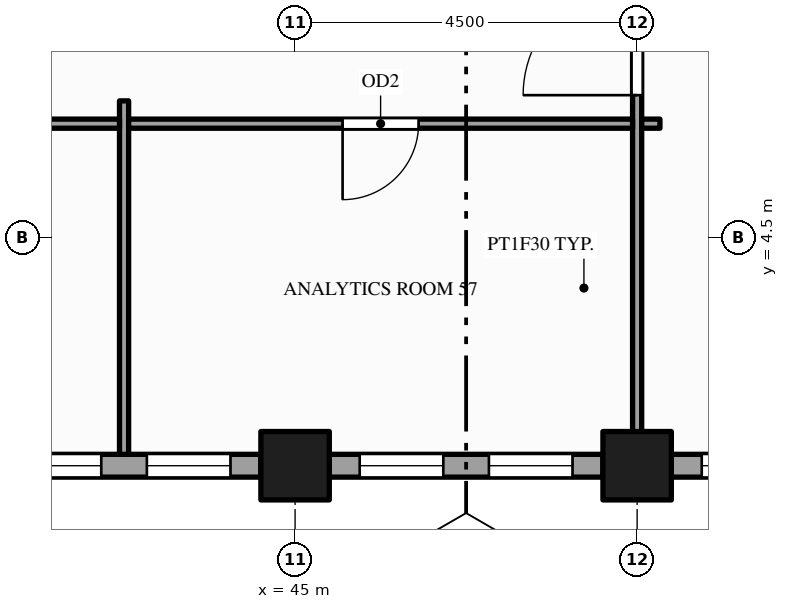
"""IFC4 building model, lengths in metres.
Left out: names, types, materials, properties, quantities, classifications, styles, units other than length and angle.
Written with IfcOpenShell. Run it as: python <this file> out.ifc"""

import sys

from ifc_helpers import new_model, si_unit, direction, frame, frame_2d, origin, origin_2d, place, context, subcontext, project, spatial, rectangle, hollow_rectangle, extrude, element, fill, save


model = new_model("IFC4")
c1 = context("Model", 3, precision=1e-05, world=origin(), true_north=direction((0.0, 1.0)))
c2 = subcontext(c1, "Body", "Model", "MODEL_VIEW")
j1 = project(units=[si_unit("LENGTHUNIT", "METRE"), si_unit("PLANEANGLEUNIT", "RADIAN")], contexts=[c1])
p1 = place(None, origin())
s1 = spatial("IfcSite", under=j1, at=p1, CompositionType="ELEMENT")
p2 = place(p1, origin())
s2 = spatial("IfcBuilding", under=s1, at=p2, CompositionType="ELEMENT")
p3 = place(p2, frame((0.0, 0.0, 183.0)))
s3 = spatial("IfcBuildingStorey", under=s2, at=p3, CompositionType="ELEMENT", Elevation=183.0)
for number, where, z_axis, x_axis in (
    (1, (45.0, 1.5, -0.15), (0.0, 0.0, 1.0), (1.0, 0.0, 0.0)),
    (2, (49.5, 1.5, -0.15), (0.0, 0.0, 1.0), (1.0, 0.0, 0.0)),
):
    element("IfcColumn", number, at=place(p3, frame(where, z_axis=z_axis, x_axis=x_axis)), inside=s3, PredefinedType="COLUMN", context=c2, shape_type="SweptSolid", body=[
        extrude(hollow_rectangle(XDim=0.9, YDim=0.9, WallThickness=0.045, at=origin_2d()), origin(), (0.0, 0.0, 1.0), 3.9),
    ])
p4 = place(p3, frame((40.95, 1.5, 0.0), z_axis=(0.0, 0.0, 1.0), x_axis=(1.0, 0.0, 0.0)))
e3 = element("IfcWall", 3, at=p4, inside=s3, PredefinedType="STANDARD", context=c2, shape_type="SweptSolid", body=[
    extrude(rectangle(XDim=3.6, YDim=0.3, at=frame_2d((1.8, 0.0))), origin(), (0.0, 0.0, 1.0), 2.77),
])
p5 = place(p4, frame((0.4, 0.0, 0.9)))
e4 = element("IfcOpeningElement", 4, at=p5, cuts=e3, PredefinedType="OPENING", context=c2, shape_type="SweptSolid", body=[
    extrude(rectangle(XDim=1.1, YDim=1.5, at=frame_2d((0.55, 0.75))), frame((0.0, 0.16, 0.0), z_axis=(0.0, -1.0, 0.0), x_axis=(1.0, 0.0, 0.0)), (0.0, 0.0, 1.0), 0.32),
])
p6 = place(p4, frame((2.1, 0.0, 0.9)))
e5 = element("IfcOpeningElement", 5, at=p6, cuts=e3, PredefinedType="OPENING", context=c2, shape_type="SweptSolid", body=[
    extrude(rectangle(XDim=1.1, YDim=1.5, at=frame_2d((0.55, 0.75))), frame((0.0, 0.16, 0.0), z_axis=(0.0, -1.0, 0.0), x_axis=(1.0, 0.0, 0.0)), (0.0, 0.0, 1.0), 0.32),
])
p7 = place(p3, frame((45.45, 1.5, 0.0), z_axis=(0.0, 0.0, 1.0), x_axis=(1.0, 0.0, 0.0)))
e6 = element("IfcWall", 6, at=p7, inside=s3, PredefinedType="STANDARD", context=c2, shape_type="SweptSolid", body=[
    extrude(rectangle(XDim=3.6, YDim=0.3, at=frame_2d((1.8, 0.0))), origin(), (0.0, 0.0, 1.0), 2.77),
])
p8 = place(p7, frame((0.4, 0.0, 0.9)))
e7 = element("IfcOpeningElement", 7, at=p8, cuts=e6, PredefinedType="OPENING", context=c2, shape_type="SweptSolid", body=[
    extrude(rectangle(XDim=1.1, YDim=1.5, at=frame_2d((0.55, 0.75))), frame((0.0, 0.16, 0.0), z_axis=(0.0, -1.0, 0.0), x_axis=(1.0, 0.0, 0.0)), (0.0, 0.0, 1.0), 0.32),
])
p9 = place(p7, frame((2.1, 0.0, 0.9)))
e8 = element("IfcOpeningElement", 8, at=p9, cuts=e6, PredefinedType="OPENING", context=c2, shape_type="SweptSolid", body=[
    extrude(rectangle(XDim=1.1, YDim=1.5, at=frame_2d((0.55, 0.75))), frame((0.0, 0.16, 0.0), z_axis=(0.0, -1.0, 0.0), x_axis=(1.0, 0.0, 0.0)), (0.0, 0.0, 1.0), 0.32),
])
p10 = place(p3, frame((49.95, 1.5, 0.0), z_axis=(0.0, 0.0, 1.0), x_axis=(1.0, 0.0, 0.0)))
e9 = element("IfcWall", 9, at=p10, inside=s3, PredefinedType="STANDARD", context=c2, shape_type="SweptSolid", body=[
    extrude(rectangle(XDim=4.05, YDim=0.3, at=frame_2d((2.025, 0.0))), origin(), (0.0, 0.0, 1.0), 2.77),
])
p11 = place(p10, frame((0.4, 0.0, 0.9)))
e10 = element("IfcOpeningElement", 10, at=p11, cuts=e9, PredefinedType="OPENING", context=c2, shape_type="SweptSolid", body=[
    extrude(rectangle(XDim=1.1, YDim=1.5, at=frame_2d((0.55, 0.75))), frame((0.0, 0.16, 0.0), z_axis=(0.0, -1.0, 0.0), x_axis=(1.0, 0.0, 0.0)), (0.0, 0.0, 1.0), 0.32),
])
p12 = place(p10, frame((2.1, 0.0, 0.9)))
e11 = element("IfcOpeningElement", 11, at=p12, cuts=e9, PredefinedType="OPENING", context=c2, shape_type="SweptSolid", body=[
    extrude(rectangle(XDim=1.55, YDim=1.5, at=frame_2d((0.775, 0.75))), frame((0.0, 0.16, 0.0), z_axis=(0.0, -1.0, 0.0), x_axis=(1.0, 0.0, 0.0)), (0.0, 0.0, 1.0), 0.32),
])
p13 = place(p3, frame((42.75, 1.65, 0.0), z_axis=(0.0, 0.0, 1.0), x_axis=(0.0, 1.0, 0.0)))
e12 = element("IfcWall", 12, at=p13, inside=s3, PredefinedType="PARTITIONING", context=c2, shape_type="SweptSolid", body=[
    extrude(rectangle(XDim=4.65, YDim=0.12, at=frame_2d((2.325, 0.0))), origin(), (0.0, 0.0, 1.0), 2.77),
])
p14 = place(p3, frame((49.5, 1.65, 0.0), z_axis=(0.0, 0.0, 1.0), x_axis=(0.0, 1.0, 0.0)))
e13 = element("IfcWall", 13, at=p14, inside=s3, PredefinedType="PARTITIONING", context=c2, shape_type="SweptSolid", body=[
    extrude(rectangle(XDim=22.2, YDim=0.12, at=frame_2d((11.1, 0.0))), origin(), (0.0, 0.0, 1.0), 2.35),
])
p15 = place(p14, frame((4.725, 0.0, 0.0)))
e14 = element("IfcOpeningElement", 14, at=p15, cuts=e13, PredefinedType="OPENING", context=c2, shape_type="SweptSolid", body=[
    extrude(rectangle(XDim=1.5, YDim=2.1, at=frame_2d((0.75, 1.05))), frame((0.0, 0.07, 0.0), z_axis=(0.0, -1.0, 0.0), x_axis=(1.0, 0.0, 0.0)), (0.0, 0.0, 1.0), 0.14),
])
p16 = place(p14, frame((15.975, 0.0, 0.0)))
e15 = element("IfcOpeningElement", 15, at=p16, cuts=e13, PredefinedType="OPENING", context=c2, shape_type="SweptSolid", body=[
    extrude(rectangle(XDim=1.5, YDim=2.1, at=frame_2d((0.75, 1.05))), frame((0.0, 0.07, 0.0), z_axis=(0.0, -1.0, 0.0), x_axis=(1.0, 0.0, 0.0)), (0.0, 0.0, 1.0), 0.14),
])
p17 = place(p14, frame((7.6, 0.0, 0.0)))
e16 = element("IfcOpeningElement", 16, at=p17, cuts=e13, PredefinedType="OPENING", context=c2, shape_type="SweptSolid", body=[
    extrude(rectangle(XDim=0.9, YDim=2.1, at=frame_2d((0.45, 1.05))), frame((0.0, 0.07, 0.0), z_axis=(0.0, -1.0, 0.0), x_axis=(1.0, 0.0, 0.0)), (0.0, 0.0, 1.0), 0.14),
])
p18 = place(p14, frame((10.65, 0.0, 0.0)))
e17 = element("IfcOpeningElement", 17, at=p18, cuts=e13, PredefinedType="OPENING", context=c2, shape_type="SweptSolid", body=[
    extrude(rectangle(XDim=0.9, YDim=2.1, at=frame_2d((0.45, 1.05))), frame((0.0, 0.07, 0.0), z_axis=(0.0, -1.0, 0.0), x_axis=(1.0, 0.0, 0.0)), (0.0, 0.0, 1.0), 0.14),
])
p19 = place(p14, frame((13.6, 0.0, 0.0)))
e18 = element("IfcOpeningElement", 18, at=p19, cuts=e13, PredefinedType="OPENING", context=c2, shape_type="SweptSolid", body=[
    extrude(rectangle(XDim=1.0, YDim=2.1, at=frame_2d((0.5, 1.05))), frame((0.0, 0.07, 0.0), z_axis=(0.0, -1.0, 0.0), x_axis=(1.0, 0.0, 0.0)), (0.0, 0.0, 1.0), 0.14),
])
p20 = place(p3, frame((38.31, 6.0, 0.0), z_axis=(0.0, 0.0, 1.0), x_axis=(1.0, 0.0, 0.0)))
e19 = element("IfcWall", 19, at=p20, inside=s3, PredefinedType="PARTITIONING", context=c2, shape_type="SweptSolid", body=[
    extrude(rectangle(XDim=4.38, YDim=0.12, at=frame_2d((2.19, 0.0))), origin(), (0.0, 0.0, 1.0), 2.77),
])
p21 = place(p20, frame((1.69, 0.0, 0.0)))
e20 = element("IfcOpeningElement", 20, at=p21, cuts=e19, PredefinedType="OPENING", context=c2, shape_type="SweptSolid", body=[
    extrude(rectangle(XDim=1.0, YDim=2.1, at=frame_2d((0.5, 1.05))), frame((0.0, 0.07, 0.0), z_axis=(0.0, -1.0, 0.0), x_axis=(1.0, 0.0, 0.0)), (0.0, 0.0, 1.0), 0.14),
])
p22 = place(p3, frame((42.81, 6.0, 0.0), z_axis=(0.0, 0.0, 1.0), x_axis=(1.0, 0.0, 0.0)))
e21 = element("IfcWall", 21, at=p22, inside=s3, PredefinedType="PARTITIONING", context=c2, shape_type="SweptSolid", body=[
    extrude(rectangle(XDim=6.63, YDim=0.12, at=frame_2d((3.315, 0.0))), origin(), (0.0, 0.0, 1.0), 2.77),
])
p23 = place(p22, frame((2.815, 0.0, 0.0)))
e22 = element("IfcOpeningElement", 22, at=p23, cuts=e21, PredefinedType="OPENING", context=c2, shape_type="SweptSolid", body=[
    extrude(rectangle(XDim=1.0, YDim=2.1, at=frame_2d((0.5, 1.05))), frame((0.0, 0.07, 0.0), z_axis=(0.0, -1.0, 0.0), x_axis=(1.0, 0.0, 0.0)), (0.0, 0.0, 1.0), 0.14),
])
p24 = place(p3, frame((49.56, 6.0, 0.0), z_axis=(0.0, 0.0, 1.0), x_axis=(1.0, 0.0, 0.0)))
e23 = element("IfcWall", 23, at=p24, inside=s3, PredefinedType="PARTITIONING", context=c2, shape_type="SweptSolid", body=[
    extrude(rectangle(XDim=0.24, YDim=0.12, at=frame_2d((0.12, 0.0))), origin(), (0.0, 0.0, 1.0), 2.77),
])
p25 = place(p5, origin())
e24 = element("IfcWindow", 24, at=p25, inside=s3, PartitioningType="SINGLE_PANEL", PredefinedType="WINDOW", context=c2, shape_type="SweptSolid", body=[
    extrude(rectangle(XDim=1.1, YDim=1.5, at=frame_2d((0.55, 0.75))), frame((0.0, 0.03, 0.0), z_axis=(0.0, -1.0, 0.0), x_axis=(1.0, 0.0, 0.0)), (0.0, 0.0, 1.0), 0.06),
])
fill(e4, e24)
p26 = place(p6, origin())
e25 = element("IfcWindow", 25, at=p26, inside=s3, PartitioningType="SINGLE_PANEL", PredefinedType="WINDOW", context=c2, shape_type="SweptSolid", body=[
    extrude(rectangle(XDim=1.1, YDim=1.5, at=frame_2d((0.55, 0.75))), frame((0.0, 0.03, 0.0), z_axis=(0.0, -1.0, 0.0), x_axis=(1.0, 0.0, 0.0)), (0.0, 0.0, 1.0), 0.06),
])
fill(e5, e25)
p27 = place(p8, origin())
e26 = element("IfcWindow", 26, at=p27, inside=s3, PartitioningType="SINGLE_PANEL", PredefinedType="WINDOW", context=c2, shape_type="SweptSolid", body=[
    extrude(rectangle(XDim=1.1, YDim=1.5, at=frame_2d((0.55, 0.75))), frame((0.0, 0.03, 0.0), z_axis=(0.0, -1.0, 0.0), x_axis=(1.0, 0.0, 0.0)), (0.0, 0.0, 1.0), 0.06),
])
fill(e7, e26)
p28 = place(p9, origin())
e27 = element("IfcWindow", 27, at=p28, inside=s3, PartitioningType="SINGLE_PANEL", PredefinedType="WINDOW", context=c2, shape_type="SweptSolid", body=[
    extrude(rectangle(XDim=1.1, YDim=1.5, at=frame_2d((0.55, 0.75))), frame((0.0, 0.03, 0.0), z_axis=(0.0, -1.0, 0.0), x_axis=(1.0, 0.0, 0.0)), (0.0, 0.0, 1.0), 0.06),
])
fill(e8, e27)
p29 = place(p11, origin())
e28 = element("IfcWindow", 28, at=p29, inside=s3, PartitioningType="SINGLE_PANEL", PredefinedType="WINDOW", context=c2, shape_type="SweptSolid", body=[
    extrude(rectangle(XDim=1.1, YDim=1.5, at=frame_2d((0.55, 0.75))), frame((0.0, 0.03, 0.0), z_axis=(0.0, -1.0, 0.0), x_axis=(1.0, 0.0, 0.0)), (0.0, 0.0, 1.0), 0.06),
])
fill(e10, e28)
p30 = place(p15, origin())
e29 = element("IfcDoor", 29, at=p30, inside=s3, OperationType="SINGLE_SWING_LEFT", PredefinedType="DOOR", context=c2, shape_type="SweptSolid", body=[
    extrude(rectangle(XDim=1.5, YDim=2.1, at=frame_2d((0.75, 1.05))), frame((0.0, 0.025, 0.0), z_axis=(0.0, -1.0, 0.0), x_axis=(1.0, 0.0, 0.0)), (0.0, 0.0, 1.0), 0.05),
])
fill(e14, e29)
p31 = place(p23, origin())
e30 = element("IfcDoor", 30, at=p31, inside=s3, OperationType="SINGLE_SWING_LEFT", PredefinedType="DOOR", context=c2, shape_type="SweptSolid", body=[
    extrude(rectangle(XDim=1.0, YDim=2.1, at=frame_2d((0.5, 1.05))), frame((0.0, 0.025, 0.0), z_axis=(0.0, -1.0, 0.0), x_axis=(1.0, 0.0, 0.0)), (0.0, 0.0, 1.0), 0.05),
])
fill(e22, e30)
save(model, sys.argv[1])
